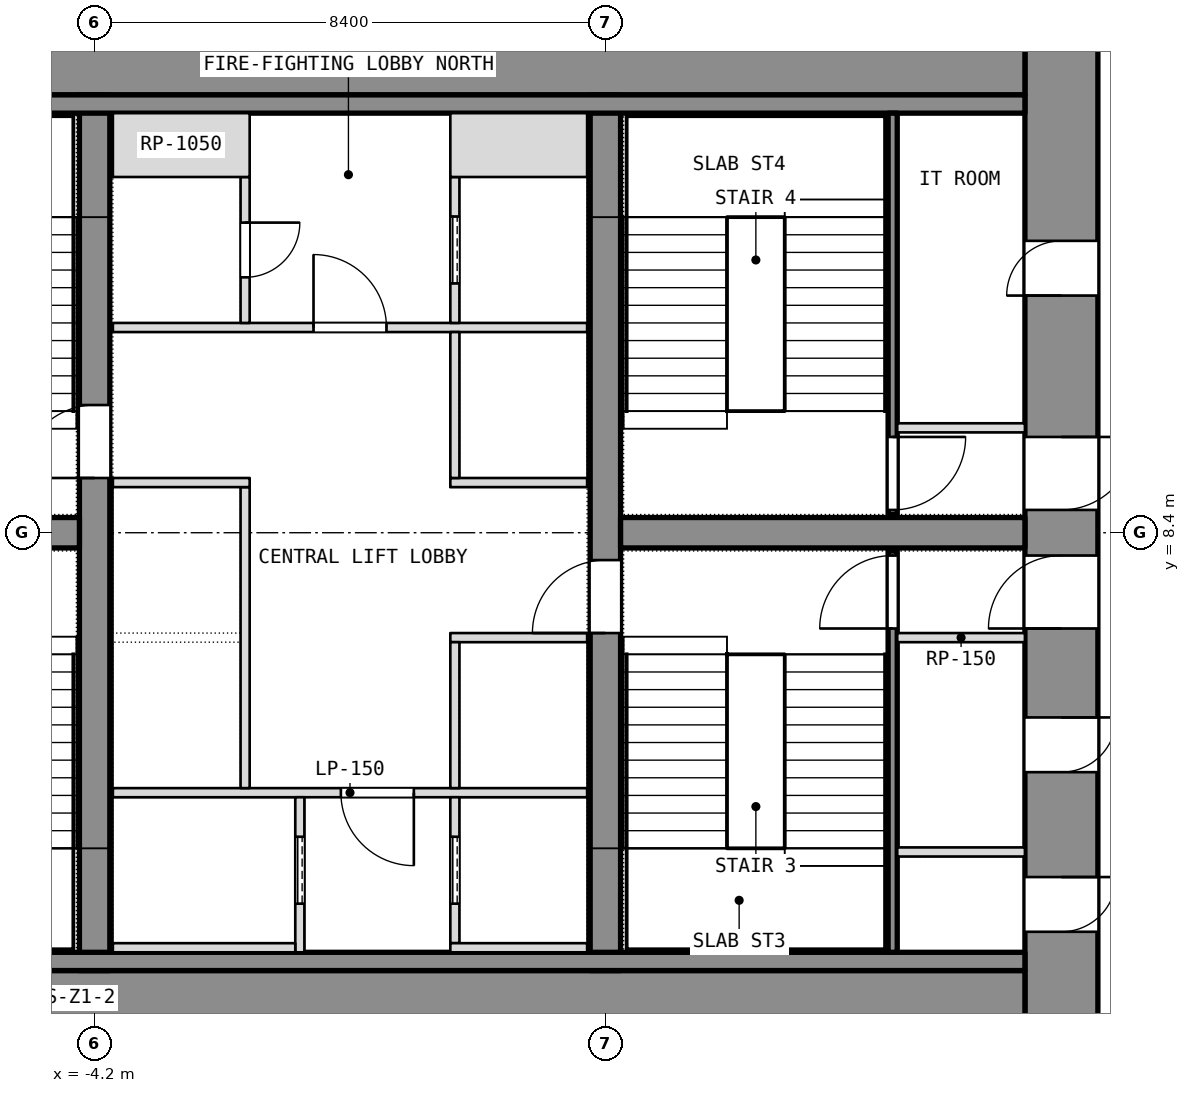
"""IFC4 building model, lengths in metres.
Left out: names, types, materials, properties, quantities, classifications, styles, units other than length and angle.
Written with IfcOpenShell. Run it as: python <this file> out.ifc"""

import sys

from ifc_helpers import new_model, si_unit, direction, frame, frame_2d, origin, place, context, subcontext, project, spatial, rectangle, extrude, element, fill, save


model = new_model("IFC4")
c1 = context("Model", 3, precision=1e-05, world=origin(), true_north=direction((0.0, 1.0)))
c2 = subcontext(c1, "Body", "Model", "MODEL_VIEW")
j1 = project(units=[si_unit("LENGTHUNIT", "METRE"), si_unit("PLANEANGLEUNIT", "RADIAN")], contexts=[c1])
p1 = place(None, origin())
s1 = spatial("IfcSite", under=j1, at=p1, CompositionType="ELEMENT")
p2 = place(p1, origin())
s2 = spatial("IfcBuilding", under=s1, at=p2, CompositionType="ELEMENT")
p3 = place(p2, frame((0.0, 0.0, 47.3)))
s3 = spatial("IfcBuildingStorey", under=s2, at=p3, CompositionType="ELEMENT", Elevation=47.3)
p4 = place(p3, frame((11.7, 0.0, 0.0), z_axis=(0.0, 0.0, 1.0), x_axis=(0.0, 1.0, 0.0)))
e1 = element("IfcWall", 1, at=p4, inside=s3, PredefinedType="SHEAR", context=c2, shape_type="SweptSolid", body=[
    extrude(rectangle(XDim=16.8, YDim=1.2, at=frame_2d((8.4, 0.0))), origin(), (0.0, 0.0, 1.0), 3.6),
])
p5 = place(p4, frame((1.837, 0.0, 0.0)))
e2 = element("IfcOpeningElement", 2, at=p5, cuts=e1, PredefinedType="OPENING", context=c2, shape_type="SweptSolid", body=[
    extrude(rectangle(XDim=0.9, YDim=2.1, at=frame_2d((0.45, 1.05))), frame((0.0, 0.6, 0.0), z_axis=(0.0, -1.0, 0.0), x_axis=(1.0, 0.0, 0.0)), (0.0, 0.0, 1.0), 1.2),
])
p6 = place(p4, frame((4.462, 0.0, 0.0)))
e3 = element("IfcOpeningElement", 3, at=p6, cuts=e1, PredefinedType="OPENING", context=c2, shape_type="SweptSolid", body=[
    extrude(rectangle(XDim=0.9, YDim=2.1, at=frame_2d((0.45, 1.05))), frame((0.0, 0.6, 0.0), z_axis=(0.0, -1.0, 0.0), x_axis=(1.0, 0.0, 0.0)), (0.0, 0.0, 1.0), 1.2),
])
p7 = place(p4, frame((6.825, 0.0, 0.0)))
e4 = element("IfcOpeningElement", 4, at=p7, cuts=e1, PredefinedType="OPENING", context=c2, shape_type="SweptSolid", body=[
    extrude(rectangle(XDim=1.2, YDim=2.1, at=frame_2d((0.6, 1.05))), frame((0.0, 0.6, 0.0), z_axis=(0.0, -1.0, 0.0), x_axis=(1.0, 0.0, 0.0)), (0.0, 0.0, 1.0), 1.2),
])
p8 = place(p4, frame((12.3, 0.0, 0.0)))
e5 = element("IfcOpeningElement", 5, at=p8, cuts=e1, PredefinedType="OPENING", context=c2, shape_type="SweptSolid", body=[
    extrude(rectangle(XDim=0.9, YDim=2.1, at=frame_2d((0.45, 1.05))), frame((0.0, 0.6, 0.0), z_axis=(0.0, -1.0, 0.0), x_axis=(1.0, 0.0, 0.0)), (0.0, 0.0, 1.0), 1.2),
])
p9 = place(p4, frame((8.775, 0.0, 0.0)))
e6 = element("IfcOpeningElement", 6, at=p9, cuts=e1, PredefinedType="OPENING", context=c2, shape_type="SweptSolid", body=[
    extrude(rectangle(XDim=1.2, YDim=2.1, at=frame_2d((0.6, 1.05))), frame((0.0, 0.6, 0.0), z_axis=(0.0, -1.0, 0.0), x_axis=(1.0, 0.0, 0.0)), (0.0, 0.0, 1.0), 1.2),
])
for number, where, z_axis, x_axis in (
    (7, (-11.1, 0.6, 0.0), (0.0, 0.0, 1.0), (1.0, 0.0, 0.0)),
    (8, (-11.1, 16.2, 0.0), (0.0, 0.0, 1.0), (1.0, 0.0, 0.0)),
):
    element("IfcWall", number, at=place(p3, frame(where, z_axis=z_axis, x_axis=x_axis)), inside=s3, PredefinedType="SHEAR", context=c2, shape_type="SweptSolid", body=[
        extrude(rectangle(XDim=22.2, YDim=1.2, at=frame_2d((11.1, 0.0))), origin(), (0.0, 0.0, 1.0), 3.6),
    ])
p10 = place(p3, frame((-4.2, 1.2, 0.0), z_axis=(0.0, 0.0, 1.0), x_axis=(0.0, 1.0, 0.0)))
e9 = element("IfcWall", 9, at=p10, inside=s3, PredefinedType="SHEAR", context=c2, shape_type="SweptSolid", body=[
    extrude(rectangle(XDim=14.4, YDim=0.5, at=frame_2d((7.2, 0.0))), origin(), (0.0, 0.0, 1.0), 3.6),
])
p11 = place(p10, frame((8.1, 0.0, 0.0)))
e10 = element("IfcOpeningElement", 10, at=p11, cuts=e9, PredefinedType="OPENING", context=c2, shape_type="SweptSolid", body=[
    extrude(rectangle(XDim=1.2, YDim=2.1, at=frame_2d((0.6, 1.05))), frame((0.0, 0.25, 0.0), z_axis=(0.0, -1.0, 0.0), x_axis=(1.0, 0.0, 0.0)), (0.0, 0.0, 1.0), 0.5),
])
p12 = place(p3, frame((4.2, 1.2, 0.0), z_axis=(0.0, 0.0, 1.0), x_axis=(0.0, 1.0, 0.0)))
e11 = element("IfcWall", 11, at=p12, inside=s3, PredefinedType="SHEAR", context=c2, shape_type="SweptSolid", body=[
    extrude(rectangle(XDim=14.4, YDim=0.5, at=frame_2d((7.2, 0.0))), origin(), (0.0, 0.0, 1.0), 3.6),
])
p13 = place(p12, frame((5.55, 0.0, 0.0)))
e12 = element("IfcOpeningElement", 12, at=p13, cuts=e11, PredefinedType="OPENING", context=c2, shape_type="SweptSolid", body=[
    extrude(rectangle(XDim=1.2, YDim=2.1, at=frame_2d((0.6, 1.05))), frame((0.0, 0.25, 0.0), z_axis=(0.0, -1.0, 0.0), x_axis=(1.0, 0.0, 0.0)), (0.0, 0.0, 1.0), 0.5),
])
for number, where, z_axis, x_axis in (
    (13, (-11.1, 8.4, 0.0), (0.0, 0.0, 1.0), (1.0, 0.0, 0.0)),
    (14, (4.45, 8.4, 0.0), (0.0, 0.0, 1.0), (1.0, 0.0, 0.0)),
):
    element("IfcWall", number, at=place(p3, frame(where, z_axis=z_axis, x_axis=x_axis)), inside=s3, PredefinedType="SHEAR", context=c2, shape_type="SweptSolid", body=[
        extrude(rectangle(XDim=6.65, YDim=0.5, at=frame_2d((3.325, 0.0))), origin(), (0.0, 0.0, 1.0), 3.6),
    ])
for number, where, z_axis, x_axis in (
    (15, (-11.1, 1.35, 0.0), (0.0, 0.0, 1.0), (1.0, 0.0, 0.0)),
    (16, (-11.1, 15.45, 0.0), (0.0, 0.0, 1.0), (1.0, 0.0, 0.0)),
):
    element("IfcWall", number, at=place(p3, frame(where, z_axis=z_axis, x_axis=x_axis)), inside=s3, PredefinedType="PARTITIONING", context=c2, shape_type="SweptSolid", body=[
        extrude(rectangle(XDim=22.2, YDim=0.3, at=frame_2d((11.1, 0.0))), origin(), (0.0, 0.0, 1.0), 3.34),
    ])
p14 = place(p3, frame((8.925, 1.5, 0.0), z_axis=(0.0, 0.0, 1.0), x_axis=(0.0, 1.0, 0.0)))
e17 = element("IfcWall", 17, at=p14, inside=s3, PredefinedType="SHEAR", context=c2, shape_type="SweptSolid", body=[
    extrude(rectangle(XDim=6.6, YDim=0.15, at=frame_2d((3.3, 0.0))), origin(), (0.0, 0.0, 1.0), 3.34),
])
p15 = place(p14, frame((5.325, 0.0, 0.0)))
e18 = element("IfcOpeningElement", 18, at=p15, cuts=e17, PredefinedType="OPENING", context=c2, shape_type="SweptSolid", body=[
    extrude(rectangle(XDim=1.2, YDim=2.1, at=frame_2d((0.6, 1.05))), frame((0.0, 0.075, 0.0), z_axis=(0.0, -1.0, 0.0), x_axis=(1.0, 0.0, 0.0)), (0.0, 0.0, 1.0), 0.15),
])
for number, where, z_axis, x_axis in (
    (19, (9.0, 6.675, 0.0), (0.0, 0.0, 1.0), (1.0, 0.0, 0.0)),
    (20, (9.0, 3.15, 0.0), (0.0, 0.0, 1.0), (1.0, 0.0, 0.0)),
):
    element("IfcWall", number, at=place(p3, frame(where, z_axis=z_axis, x_axis=x_axis)), inside=s3, PredefinedType="PARTITIONING", context=c2, shape_type="SweptSolid", body=[
        extrude(rectangle(XDim=2.1, YDim=0.15, at=frame_2d((1.05, 0.0))), origin(), (0.0, 0.0, 1.0), 3.34),
    ])
p16 = place(p3, frame((8.925, 8.7, 0.0), z_axis=(0.0, 0.0, 1.0), x_axis=(0.0, 1.0, 0.0)))
e21 = element("IfcWall", 21, at=p16, inside=s3, PredefinedType="SHEAR", context=c2, shape_type="SweptSolid", body=[
    extrude(rectangle(XDim=6.6, YDim=0.15, at=frame_2d((3.3, 0.0))), origin(), (0.0, 0.0, 1.0), 3.34),
])
p17 = place(p16, frame((0.075, 0.0, 0.0)))
e22 = element("IfcOpeningElement", 22, at=p17, cuts=e21, PredefinedType="OPENING", context=c2, shape_type="SweptSolid", body=[
    extrude(rectangle(XDim=1.2, YDim=2.1, at=frame_2d((0.6, 1.05))), frame((0.0, 0.075, 0.0), z_axis=(0.0, -1.0, 0.0), x_axis=(1.0, 0.0, 0.0)), (0.0, 0.0, 1.0), 0.15),
])
p18 = place(p3, frame((9.0, 10.125, 0.0), z_axis=(0.0, 0.0, 1.0), x_axis=(1.0, 0.0, 0.0)))
e23 = element("IfcWall", 23, at=p18, inside=s3, PredefinedType="PARTITIONING", context=c2, shape_type="SweptSolid", body=[
    extrude(rectangle(XDim=2.1, YDim=0.15, at=frame_2d((1.05, 0.0))), origin(), (0.0, 0.0, 1.0), 3.34),
])
p19 = place(p3, frame((-3.9, 4.125, 0.0), z_axis=(0.0, 0.0, 1.0), x_axis=(1.0, 0.0, 0.0)))
e24 = element("IfcWall", 24, at=p19, inside=s3, PredefinedType="PARTITIONING", context=c2, shape_type="SweptSolid", body=[
    extrude(rectangle(XDim=7.8, YDim=0.15, at=frame_2d((3.9, 0.0))), origin(), (0.0, 0.0, 1.0), 3.34),
])
p20 = place(p19, frame((3.75, 0.0, 0.0)))
e25 = element("IfcOpeningElement", 25, at=p20, cuts=e24, PredefinedType="OPENING", context=c2, shape_type="SweptSolid", body=[
    extrude(rectangle(XDim=1.2, YDim=2.1, at=frame_2d((0.6, 1.05))), frame((0.0, 0.075, 0.0), z_axis=(0.0, -1.0, 0.0), x_axis=(1.0, 0.0, 0.0)), (0.0, 0.0, 1.0), 0.15),
])
p21 = place(p3, frame((-3.9, 11.775, 0.0), z_axis=(0.0, 0.0, 1.0), x_axis=(1.0, 0.0, 0.0)))
e26 = element("IfcWall", 26, at=p21, inside=s3, PredefinedType="PARTITIONING", context=c2, shape_type="SweptSolid", body=[
    extrude(rectangle(XDim=7.8, YDim=0.15, at=frame_2d((3.9, 0.0))), origin(), (0.0, 0.0, 1.0), 3.34),
])
p22 = place(p21, frame((3.3, 0.0, 0.0)))
e27 = element("IfcOpeningElement", 27, at=p22, cuts=e26, PredefinedType="OPENING", context=c2, shape_type="SweptSolid", body=[
    extrude(rectangle(XDim=1.2, YDim=2.1, at=frame_2d((0.6, 1.05))), frame((0.0, 0.075, 0.0), z_axis=(0.0, -1.0, 0.0), x_axis=(1.0, 0.0, 0.0)), (0.0, 0.0, 1.0), 0.15),
])
p23 = place(p3, frame((-0.825, 1.5, 0.0), z_axis=(0.0, 0.0, 1.0), x_axis=(0.0, 1.0, 0.0)))
e28 = element("IfcWall", 28, at=p23, inside=s3, PredefinedType="SHEAR", context=c2, shape_type="SweptSolid", body=[
    extrude(rectangle(XDim=2.55, YDim=0.15, at=frame_2d((1.275, 0.0))), origin(), (0.0, 0.0, 1.0), 3.6),
])
p24 = place(p23, frame((0.8, 0.0, 0.0)))
e29 = element("IfcOpeningElement", 29, at=p24, cuts=e28, PredefinedType="OPENING", context=c2, shape_type="SweptSolid", body=[
    extrude(rectangle(XDim=1.1, YDim=2.1, at=frame_2d((0.55, 1.05))), frame((0.0, 0.075, 0.0), z_axis=(0.0, -1.0, 0.0), x_axis=(1.0, 0.0, 0.0)), (0.0, 0.0, 1.0), 0.15),
])
p25 = place(p3, frame((-3.9, 1.575, 0.0), z_axis=(0.0, 0.0, 1.0), x_axis=(1.0, 0.0, 0.0)))
e30 = element("IfcWall", 30, at=p25, inside=s3, PredefinedType="SHEAR", context=c2, shape_type="SweptSolid", body=[
    extrude(rectangle(XDim=3.0, YDim=0.15, at=frame_2d((1.5, 0.0))), origin(), (0.0, 0.0, 1.0), 3.6),
])
p26 = place(p3, frame((-1.725, 4.2, 0.0), z_axis=(0.0, 0.0, 1.0), x_axis=(0.0, 1.0, 0.0)))
e31 = element("IfcWall", 31, at=p26, inside=s3, PredefinedType="SHEAR", context=c2, shape_type="SweptSolid", body=[
    extrude(rectangle(XDim=4.95, YDim=0.15, at=frame_2d((2.475, 0.0))), origin(), (0.0, 0.0, 1.0), 3.6),
])
p27 = place(p3, frame((-3.9, 9.225, 0.0), z_axis=(0.0, 0.0, 1.0), x_axis=(1.0, 0.0, 0.0)))
e32 = element("IfcWall", 32, at=p27, inside=s3, PredefinedType="SHEAR", context=c2, shape_type="SweptSolid", body=[
    extrude(rectangle(XDim=2.25, YDim=0.15, at=frame_2d((1.125, 0.0))), origin(), (0.0, 0.0, 1.0), 3.6),
])
p28 = place(p3, frame((-1.725, 11.85, 0.0), z_axis=(0.0, 0.0, 1.0), x_axis=(0.0, 1.0, 0.0)))
e33 = element("IfcWall", 33, at=p28, inside=s3, PredefinedType="PARTITIONING", context=c2, shape_type="SweptSolid", body=[
    extrude(rectangle(XDim=2.4, YDim=0.15, at=frame_2d((1.2, 0.0))), origin(), (0.0, 0.0, 1.0), 3.34),
])
p29 = place(p28, frame((0.75, 0.0, 0.0)))
e34 = element("IfcOpeningElement", 34, at=p29, cuts=e33, PredefinedType="OPENING", context=c2, shape_type="SweptSolid", body=[
    extrude(rectangle(XDim=0.9, YDim=2.1, at=frame_2d((0.45, 1.05))), frame((0.0, 0.075, 0.0), z_axis=(0.0, -1.0, 0.0), x_axis=(1.0, 0.0, 0.0)), (0.0, 0.0, 1.0), 0.15),
])
p30 = place(p3, frame((-3.9, 14.775, 0.0), z_axis=(0.0, 0.0, 1.0), x_axis=(1.0, 0.0, 0.0)))
e35 = element("IfcWall", 35, at=p30, inside=s3, PredefinedType="PARTITIONING", context=c2, shape_type="SweptSolid", body=[
    extrude(rectangle(XDim=2.25, YDim=1.05, at=frame_2d((1.125, 0.0))), origin(), (0.0, 0.0, 1.0), 3.34),
])
p31 = place(p3, frame((1.725, 1.65, 0.0), z_axis=(0.0, 0.0, 1.0), x_axis=(0.0, 1.0, 0.0)))
e36 = element("IfcWall", 36, at=p31, inside=s3, PredefinedType="SHEAR", context=c2, shape_type="SweptSolid", body=[
    extrude(rectangle(XDim=2.4, YDim=0.15, at=frame_2d((1.2, 0.0))), origin(), (0.0, 0.0, 1.0), 3.6),
])
p32 = place(p31, frame((0.65, 0.0, 0.0)))
e37 = element("IfcOpeningElement", 37, at=p32, cuts=e36, PredefinedType="OPENING", context=c2, shape_type="SweptSolid", body=[
    extrude(rectangle(XDim=1.1, YDim=2.1, at=frame_2d((0.55, 1.05))), frame((0.0, 0.075, 0.0), z_axis=(0.0, -1.0, 0.0), x_axis=(1.0, 0.0, 0.0)), (0.0, 0.0, 1.0), 0.15),
])
p33 = place(p3, frame((1.65, 1.575, 0.0), z_axis=(0.0, 0.0, 1.0), x_axis=(1.0, 0.0, 0.0)))
e38 = element("IfcWall", 38, at=p33, inside=s3, PredefinedType="SHEAR", context=c2, shape_type="SweptSolid", body=[
    extrude(rectangle(XDim=2.25, YDim=0.15, at=frame_2d((1.125, 0.0))), origin(), (0.0, 0.0, 1.0), 3.6),
])
p34 = place(p3, frame((1.725, 11.85, 0.0), z_axis=(0.0, 0.0, 1.0), x_axis=(0.0, 1.0, 0.0)))
e39 = element("IfcWall", 39, at=p34, inside=s3, PredefinedType="SHEAR", context=c2, shape_type="SweptSolid", body=[
    extrude(rectangle(XDim=2.4, YDim=0.15, at=frame_2d((1.2, 0.0))), origin(), (0.0, 0.0, 1.0), 3.6),
])
p35 = place(p34, frame((0.65, 0.0, 0.0)))
e40 = element("IfcOpeningElement", 40, at=p35, cuts=e39, PredefinedType="OPENING", context=c2, shape_type="SweptSolid", body=[
    extrude(rectangle(XDim=1.1, YDim=2.1, at=frame_2d((0.55, 1.05))), frame((0.0, 0.075, 0.0), z_axis=(0.0, -1.0, 0.0), x_axis=(1.0, 0.0, 0.0)), (0.0, 0.0, 1.0), 0.15),
])
p36 = place(p3, frame((1.65, 14.775, 0.0), z_axis=(0.0, 0.0, 1.0), x_axis=(1.0, 0.0, 0.0)))
e41 = element("IfcWall", 41, at=p36, inside=s3, PredefinedType="SHEAR", context=c2, shape_type="SweptSolid", body=[
    extrude(rectangle(XDim=2.25, YDim=1.05, at=frame_2d((1.125, 0.0))), origin(), (0.0, 0.0, 1.0), 3.6),
])
for number, where, z_axis, x_axis in (
    (42, (1.65, 6.675, 0.0), (0.0, 0.0, 1.0), (1.0, 0.0, 0.0)),
    (43, (1.65, 9.225, 0.0), (0.0, 0.0, 1.0), (1.0, 0.0, 0.0)),
):
    element("IfcWall", number, at=place(p3, frame(where, z_axis=z_axis, x_axis=x_axis)), inside=s3, PredefinedType="SHEAR", context=c2, shape_type="SweptSolid", body=[
        extrude(rectangle(XDim=2.25, YDim=0.15, at=frame_2d((1.125, 0.0))), origin(), (0.0, 0.0, 1.0), 3.6),
    ])
p37 = place(p3, frame((1.725, 4.2, 0.0), z_axis=(0.0, 0.0, 1.0), x_axis=(0.0, 1.0, 0.0)))
e44 = element("IfcWall", 44, at=p37, inside=s3, PredefinedType="SHEAR", context=c2, shape_type="SweptSolid", body=[
    extrude(rectangle(XDim=2.4, YDim=0.15, at=frame_2d((1.2, 0.0))), origin(), (0.0, 0.0, 1.0), 3.6),
])
p38 = place(p3, frame((1.725, 9.3, 0.0), z_axis=(0.0, 0.0, 1.0), x_axis=(0.0, 1.0, 0.0)))
e45 = element("IfcWall", 45, at=p38, inside=s3, PredefinedType="SHEAR", context=c2, shape_type="SweptSolid", body=[
    extrude(rectangle(XDim=2.4, YDim=0.15, at=frame_2d((1.2, 0.0))), origin(), (0.0, 0.0, 1.0), 3.6),
])
p39 = place(p5, origin())
e46 = element("IfcDoor", 46, at=p39, inside=s3, OperationType="SINGLE_SWING_LEFT", PredefinedType="DOOR", context=c2, shape_type="SweptSolid", body=[
    extrude(rectangle(XDim=0.9, YDim=2.1, at=frame_2d((0.45, 1.05))), frame((0.0, 0.025, 0.0), z_axis=(0.0, -1.0, 0.0), x_axis=(1.0, 0.0, 0.0)), (0.0, 0.0, 1.0), 0.05),
])
fill(e2, e46)
p40 = place(p6, origin())
e47 = element("IfcDoor", 47, at=p40, inside=s3, OperationType="SINGLE_SWING_LEFT", PredefinedType="DOOR", context=c2, shape_type="SweptSolid", body=[
    extrude(rectangle(XDim=0.9, YDim=2.1, at=frame_2d((0.45, 1.05))), frame((0.0, 0.025, 0.0), z_axis=(0.0, -1.0, 0.0), x_axis=(1.0, 0.0, 0.0)), (0.0, 0.0, 1.0), 0.05),
])
fill(e3, e47)
p41 = place(p7, origin())
e48 = element("IfcDoor", 48, at=p41, inside=s3, OperationType="SINGLE_SWING_LEFT", PredefinedType="DOOR", context=c2, shape_type="SweptSolid", body=[
    extrude(rectangle(XDim=1.2, YDim=2.1, at=frame_2d((0.6, 1.05))), frame((0.0, 0.025, 0.0), z_axis=(0.0, -1.0, 0.0), x_axis=(1.0, 0.0, 0.0)), (0.0, 0.0, 1.0), 0.05),
])
fill(e4, e48)
p42 = place(p15, origin())
e49 = element("IfcDoor", 49, at=p42, inside=s3, OperationType="SINGLE_SWING_LEFT", PredefinedType="DOOR", context=c2, shape_type="SweptSolid", body=[
    extrude(rectangle(XDim=1.2, YDim=2.1, at=frame_2d((0.6, 1.05))), frame((0.0, 0.025, 0.0), z_axis=(0.0, -1.0, 0.0), x_axis=(1.0, 0.0, 0.0)), (0.0, 0.0, 1.0), 0.05),
])
fill(e18, e49)
p43 = place(p8, origin())
e50 = element("IfcDoor", 50, at=p43, inside=s3, OperationType="SINGLE_SWING_LEFT", PredefinedType="DOOR", context=c2, shape_type="SweptSolid", body=[
    extrude(rectangle(XDim=0.9, YDim=2.1, at=frame_2d((0.45, 1.05))), frame((0.0, 0.025, 0.0), z_axis=(0.0, -1.0, 0.0), x_axis=(1.0, 0.0, 0.0)), (0.0, 0.0, 1.0), 0.05),
])
fill(e5, e50)
p44 = place(p9, origin())
e51 = element("IfcDoor", 51, at=p44, inside=s3, OperationType="SINGLE_SWING_LEFT", PredefinedType="DOOR", context=c2, shape_type="SweptSolid", body=[
    extrude(rectangle(XDim=1.2, YDim=2.1, at=frame_2d((0.6, 1.05))), frame((0.0, 0.025, 0.0), z_axis=(0.0, -1.0, 0.0), x_axis=(1.0, 0.0, 0.0)), (0.0, 0.0, 1.0), 0.05),
])
fill(e6, e51)
p45 = place(p17, origin())
e52 = element("IfcDoor", 52, at=p45, inside=s3, OperationType="SINGLE_SWING_LEFT", PredefinedType="DOOR", context=c2, shape_type="SweptSolid", body=[
    extrude(rectangle(XDim=1.2, YDim=2.1, at=frame_2d((0.6, 1.05))), frame((0.0, 0.025, 0.0), z_axis=(0.0, -1.0, 0.0), x_axis=(1.0, 0.0, 0.0)), (0.0, 0.0, 1.0), 0.05),
])
fill(e22, e52)
p46 = place(p24, origin())
e53 = element("IfcDoor", 53, at=p46, inside=s3, OperationType="SLIDING_TO_LEFT", PredefinedType="DOOR", context=c2, shape_type="SweptSolid", body=[
    extrude(rectangle(XDim=1.1, YDim=2.1, at=frame_2d((0.55, 1.05))), frame((0.0, 0.025, 0.0), z_axis=(0.0, -1.0, 0.0), x_axis=(1.0, 0.0, 0.0)), (0.0, 0.0, 1.0), 0.05),
])
fill(e29, e53)
p47 = place(p32, origin())
e54 = element("IfcDoor", 54, at=p47, inside=s3, OperationType="SLIDING_TO_LEFT", PredefinedType="DOOR", context=c2, shape_type="SweptSolid", body=[
    extrude(rectangle(XDim=1.1, YDim=2.1, at=frame_2d((0.55, 1.05))), frame((0.0, 0.025, 0.0), z_axis=(0.0, -1.0, 0.0), x_axis=(1.0, 0.0, 0.0)), (0.0, 0.0, 1.0), 0.05),
])
fill(e37, e54)
p48 = place(p35, origin())
e55 = element("IfcDoor", 55, at=p48, inside=s3, OperationType="SLIDING_TO_LEFT", PredefinedType="DOOR", context=c2, shape_type="SweptSolid", body=[
    extrude(rectangle(XDim=1.1, YDim=2.1, at=frame_2d((0.55, 1.05))), frame((0.0, 0.025, 0.0), z_axis=(0.0, -1.0, 0.0), x_axis=(1.0, 0.0, 0.0)), (0.0, 0.0, 1.0), 0.05),
])
fill(e40, e55)
p49 = place(p20, origin())
e56 = element("IfcDoor", 56, at=p49, inside=s3, OperationType="SINGLE_SWING_LEFT", PredefinedType="DOOR", context=c2, shape_type="SweptSolid", body=[
    extrude(rectangle(XDim=1.2, YDim=2.1, at=frame_2d((0.6, 1.05))), frame((0.0, 0.025, 0.0), z_axis=(0.0, -1.0, 0.0), x_axis=(1.0, 0.0, 0.0)), (0.0, 0.0, 1.0), 0.05),
])
fill(e25, e56)
p50 = place(p22, origin())
e57 = element("IfcDoor", 57, at=p50, inside=s3, OperationType="SINGLE_SWING_LEFT", PredefinedType="DOOR", context=c2, shape_type="SweptSolid", body=[
    extrude(rectangle(XDim=1.2, YDim=2.1, at=frame_2d((0.6, 1.05))), frame((0.0, 0.025, 0.0), z_axis=(0.0, -1.0, 0.0), x_axis=(1.0, 0.0, 0.0)), (0.0, 0.0, 1.0), 0.05),
])
fill(e27, e57)
p51 = place(p29, origin())
e58 = element("IfcDoor", 58, at=p51, inside=s3, OperationType="SINGLE_SWING_LEFT", PredefinedType="DOOR", context=c2, shape_type="SweptSolid", body=[
    extrude(rectangle(XDim=0.9, YDim=2.1, at=frame_2d((0.45, 1.05))), frame((0.0, 0.025, 0.0), z_axis=(0.0, -1.0, 0.0), x_axis=(1.0, 0.0, 0.0)), (0.0, 0.0, 1.0), 0.05),
])
fill(e34, e58)
p52 = place(p11, origin())
e59 = element("IfcDoor", 59, at=p52, inside=s3, OperationType="SINGLE_SWING_LEFT", PredefinedType="DOOR", context=c2, shape_type="SweptSolid", body=[
    extrude(rectangle(XDim=1.2, YDim=2.1, at=frame_2d((0.6, 1.05))), frame((0.0, 0.025, 0.0), z_axis=(0.0, -1.0, 0.0), x_axis=(1.0, 0.0, 0.0)), (0.0, 0.0, 1.0), 0.05),
])
fill(e10, e59)
p53 = place(p13, origin())
e60 = element("IfcDoor", 60, at=p53, inside=s3, OperationType="SINGLE_SWING_LEFT", PredefinedType="DOOR", context=c2, shape_type="SweptSolid", body=[
    extrude(rectangle(XDim=1.2, YDim=2.1, at=frame_2d((0.6, 1.05))), frame((0.0, 0.025, 0.0), z_axis=(0.0, -1.0, 0.0), x_axis=(1.0, 0.0, 0.0)), (0.0, 0.0, 1.0), 0.05),
])
fill(e12, e60)
save(model, sys.argv[1])
